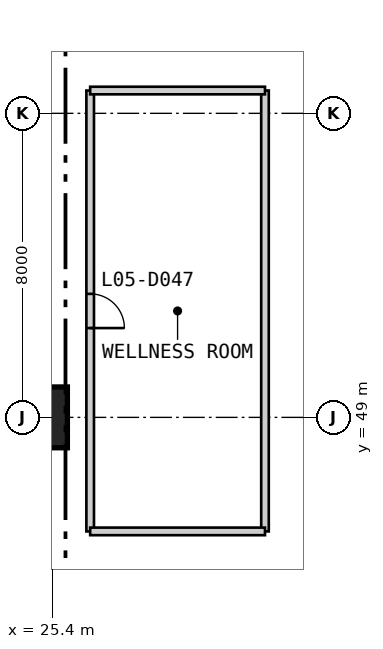
"""IFC4 building model, lengths in metres.
Left out: names, types, materials, properties, quantities, classifications, styles, units other than length and angle.
Written with IfcOpenShell. Run it as: python <this file> out.ifc"""

import sys

from ifc_helpers import new_model, si_unit, direction, frame, frame_2d, origin, origin_2d, place, context, subcontext, project, spatial, rectangle, extrude, element, fill, save


model = new_model("IFC4")
c1 = context("Model", 3, precision=1e-05, world=origin(), true_north=direction((0.0, 1.0)))
c2 = subcontext(c1, "Body", "Model", "MODEL_VIEW")
j1 = project(units=[si_unit("LENGTHUNIT", "METRE"), si_unit("PLANEANGLEUNIT", "RADIAN")], contexts=[c1])
p1 = place(None, origin())
s1 = spatial("IfcSite", under=j1, at=p1, CompositionType="ELEMENT")
p2 = place(p1, origin())
s2 = spatial("IfcBuilding", under=s1, at=p2, CompositionType="ELEMENT")
p3 = place(p2, frame((0.0, 0.0, 26.2)))
s3 = spatial("IfcBuildingStorey", under=s2, at=p3, CompositionType="ELEMENT", Elevation=26.2)
p4 = place(p3, frame((25.0, 49.0, 0.0), z_axis=(0.0, 0.0, 1.0), x_axis=(1.0, 0.0, 0.0)))
e1 = element("IfcColumn", 1, at=p4, inside=s3, PredefinedType="COLUMN", context=c2, shape_type="SweptSolid", body=[
    extrude(rectangle(XDim=1.6, YDim=1.6, at=origin_2d()), origin(), (0.0, 0.0, 1.0), 4.8),
])
p5 = place(p3, frame((26.4, 46.0, 0.0), z_axis=(0.0, 0.0, 1.0), x_axis=(0.0, 1.0, 0.0)))
e2 = element("IfcWall", 2, at=p5, inside=s3, PredefinedType="PARTITIONING", context=c2, shape_type="SweptSolid", body=[
    extrude(rectangle(XDim=11.6, YDim=0.2, at=frame_2d((5.8, 0.0))), origin(), (0.0, 0.0, 1.0), 4.5),
])
p6 = place(p5, frame((5.35, 0.0, 0.0)))
e3 = element("IfcOpeningElement", 3, at=p6, cuts=e2, PredefinedType="OPENING", context=c2, shape_type="SweptSolid", body=[
    extrude(rectangle(XDim=0.9, YDim=2.2, at=frame_2d((0.45, 1.1))), frame((0.0, 0.11, 0.0), z_axis=(0.0, -1.0, 0.0), x_axis=(1.0, 0.0, 0.0)), (0.0, 0.0, 1.0), 0.22),
])
p7 = place(p3, frame((31.0, 46.0, 0.0), z_axis=(0.0, 0.0, 1.0), x_axis=(0.0, 1.0, 0.0)))
e4 = element("IfcWall", 4, at=p7, inside=s3, PredefinedType="PARTITIONING", context=c2, shape_type="SweptSolid", body=[
    extrude(rectangle(XDim=11.6, YDim=0.2, at=frame_2d((5.8, 0.0))), origin(), (0.0, 0.0, 1.0), 3.893),
])
for number, where, z_axis, x_axis in (
    (5, (26.4, 46.0, 0.0), (0.0, 0.0, 1.0), (1.0, 0.0, 0.0)),
    (6, (26.4, 57.6, 0.0), (0.0, 0.0, 1.0), (1.0, 0.0, 0.0)),
):
    element("IfcWall", number, at=place(p3, frame(where, z_axis=z_axis, x_axis=x_axis)), inside=s3, PredefinedType="PARTITIONING", context=c2, shape_type="SweptSolid", body=[
        extrude(rectangle(XDim=4.6, YDim=0.2, at=frame_2d((2.3, 0.0))), origin(), (0.0, 0.0, 1.0), 4.5),
    ])
p8 = place(p6, frame((0.9, 0.0, 0.0), z_axis=(0.0, 0.0, 1.0), x_axis=(-1.0, 0.0, 0.0)))
e7 = element("IfcDoor", 7, at=p8, inside=s3, OperationType="SINGLE_SWING_RIGHT", PredefinedType="DOOR", context=c2, shape_type="SweptSolid", body=[
    extrude(rectangle(XDim=0.9, YDim=2.2, at=frame_2d((0.45, 1.1))), frame((0.0, 0.025, 0.0), z_axis=(0.0, -1.0, 0.0), x_axis=(1.0, 0.0, 0.0)), (0.0, 0.0, 1.0), 0.05),
])
fill(e3, e7)
save(model, sys.argv[1])
